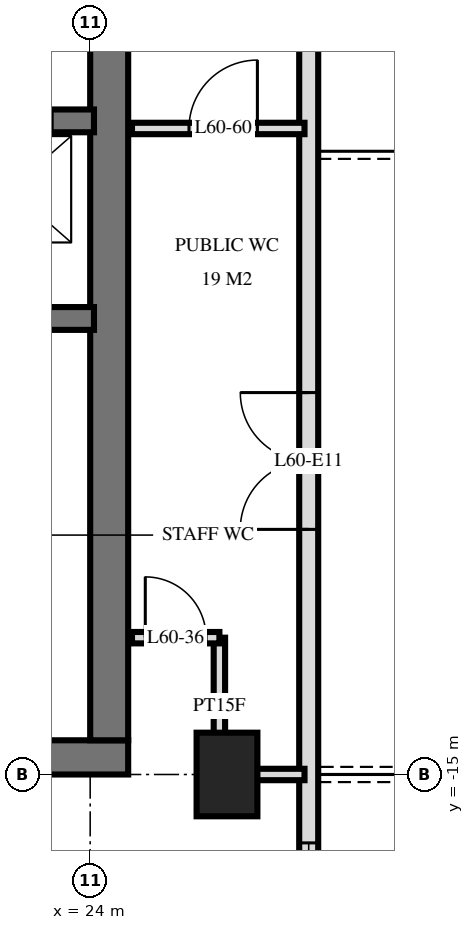
"""IFC4 building model, lengths in metres.
Left out: names, types, materials, properties, quantities, classifications, styles, units other than length and angle.
Written with IfcOpenShell. Run it as: python <this file> out.ifc"""

import sys

from ifc_helpers import new_model, si_unit, direction, frame, frame_2d, origin, origin_2d, place, context, subcontext, project, spatial, rectangle, extrude, element, fill, save


model = new_model("IFC4")
c1 = context("Model", 3, precision=1e-05, world=origin(), true_north=direction((0.0, 1.0)))
c2 = subcontext(c1, "Body", "Model", "MODEL_VIEW")
j1 = project(units=[si_unit("LENGTHUNIT", "METRE"), si_unit("PLANEANGLEUNIT", "RADIAN")], contexts=[c1])
p1 = place(None, origin())
s1 = spatial("IfcSite", under=j1, at=p1, CompositionType="ELEMENT")
p2 = place(p1, origin())
s2 = spatial("IfcBuilding", under=s1, at=p2, CompositionType="ELEMENT")
p3 = place(p2, frame((0.0, 0.0, 229.1)))
s3 = spatial("IfcBuildingStorey", under=s2, at=p3, CompositionType="ELEMENT", Elevation=229.1)
p4 = place(p3, frame((25.8, -15.0, 0.0), z_axis=(0.0, 0.0, 1.0), x_axis=(0.0, 1.0, 0.0)))
e1 = element("IfcColumn", 1, at=p4, inside=s3, PredefinedType="COLUMN", context=c2, shape_type="SweptSolid", body=[
    extrude(rectangle(XDim=1.1, YDim=0.8, at=origin_2d()), origin(), (0.0, 0.0, 1.0), 3.5),
])
p5 = place(p3, frame((10.0, -14.775, 0.0), z_axis=(0.0, 0.0, 1.0), x_axis=(1.0, 0.0, 0.0)))
e2 = element("IfcWall", 2, at=p5, inside=s3, PredefinedType="SHEAR", context=c2, shape_type="SweptSolid", body=[
    extrude(rectangle(XDim=14.5, YDim=0.45, at=frame_2d((7.25, 0.0))), origin(), (0.0, 0.0, 1.0), 3.5),
])
p6 = place(p5, frame((7.1, 0.0, 0.0)))
e3 = element("IfcOpeningElement", 3, at=p6, cuts=e2, PredefinedType="OPENING", context=c2, shape_type="SweptSolid", body=[
    extrude(rectangle(XDim=1.2, YDim=2.1, at=frame_2d((0.6, 1.05))), frame((0.0, 0.235, 0.0), z_axis=(0.0, -1.0, 0.0), x_axis=(1.0, 0.0, 0.0)), (0.0, 0.0, 1.0), 0.47),
])
p7 = place(p5, frame((4.15, 0.0, 0.0)))
e4 = element("IfcOpeningElement", 4, at=p7, cuts=e2, PredefinedType="OPENING", context=c2, shape_type="SweptSolid", body=[
    extrude(rectangle(XDim=1.1, YDim=2.1, at=frame_2d((0.55, 1.05))), frame((0.0, 0.235, 0.0), z_axis=(0.0, -1.0, 0.0), x_axis=(1.0, 0.0, 0.0)), (0.0, 0.0, 1.0), 0.47),
])
p8 = place(p5, frame((10.1, 0.0, 0.0)))
e5 = element("IfcOpeningElement", 5, at=p8, cuts=e2, PredefinedType="OPENING", context=c2, shape_type="SweptSolid", body=[
    extrude(rectangle(XDim=0.9, YDim=2.1, at=frame_2d((0.45, 1.05))), frame((0.0, 0.235, 0.0), z_axis=(0.0, -1.0, 0.0), x_axis=(1.0, 0.0, 0.0)), (0.0, 0.0, 1.0), 0.47),
])
p9 = place(p5, frame((12.45, 0.0, 0.0)))
e6 = element("IfcOpeningElement", 6, at=p9, cuts=e2, PredefinedType="OPENING", context=c2, shape_type="SweptSolid", body=[
    extrude(rectangle(XDim=1.0, YDim=2.1, at=frame_2d((0.5, 1.05))), frame((0.0, 0.235, 0.0), z_axis=(0.0, -1.0, 0.0), x_axis=(1.0, 0.0, 0.0)), (0.0, 0.0, 1.0), 0.47),
])
p10 = place(p3, frame((24.25, -14.55, 0.0), z_axis=(0.0, 0.0, 1.0), x_axis=(0.0, 1.0, 0.0)))
e7 = element("IfcWall", 7, at=p10, inside=s3, PredefinedType="SHEAR", context=c2, shape_type="SweptSolid", body=[
    extrude(rectangle(XDim=14.1, YDim=0.5, at=frame_2d((7.05, 0.0))), origin(), (0.0, 0.0, 1.0), 3.5),
])
p11 = place(p3, frame((10.35, -6.4, 0.0), z_axis=(0.0, 0.0, 1.0), x_axis=(1.0, 0.0, 0.0)))
e8 = element("IfcWall", 8, at=p11, inside=s3, PredefinedType="SHEAR", context=c2, shape_type="SweptSolid", body=[
    extrude(rectangle(XDim=13.7, YDim=0.3, at=frame_2d((6.85, 0.0))), origin(), (0.0, 0.0, 1.0), 3.5),
])
p12 = place(p11, frame((12.05, 0.0, 0.0)))
e9 = element("IfcOpeningElement", 9, at=p12, cuts=e8, PredefinedType="OPENING", context=c2, shape_type="SweptSolid", body=[
    extrude(rectangle(XDim=1.1, YDim=2.1, at=frame_2d((0.55, 1.05))), frame((0.0, 0.16, 0.0), z_axis=(0.0, -1.0, 0.0), x_axis=(1.0, 0.0, 0.0)), (0.0, 0.0, 1.0), 0.32),
])
p13 = place(p11, frame((6.8, 0.0, 0.0)))
e10 = element("IfcOpeningElement", 10, at=p13, cuts=e8, PredefinedType="OPENING", context=c2, shape_type="SweptSolid", body=[
    extrude(rectangle(XDim=1.1, YDim=2.1, at=frame_2d((0.55, 1.05))), frame((0.0, 0.16, 0.0), z_axis=(0.0, -1.0, 0.0), x_axis=(1.0, 0.0, 0.0)), (0.0, 0.0, 1.0), 0.32),
])
p14 = place(p3, frame((10.35, -9.0, 0.0), z_axis=(0.0, 0.0, 1.0), x_axis=(1.0, 0.0, 0.0)))
e11 = element("IfcWall", 11, at=p14, inside=s3, PredefinedType="SHEAR", context=c2, shape_type="SweptSolid", body=[
    extrude(rectangle(XDim=13.7, YDim=0.3, at=frame_2d((6.85, 0.0))), origin(), (0.0, 0.0, 1.0), 3.5),
])
p15 = place(p14, frame((3.8, 0.0, 0.0)))
e12 = element("IfcOpeningElement", 12, at=p15, cuts=e11, PredefinedType="OPENING", context=c2, shape_type="SweptSolid", body=[
    extrude(rectangle(XDim=1.1, YDim=2.1, at=frame_2d((0.55, 1.05))), frame((0.0, 0.16, 0.0), z_axis=(0.0, -1.0, 0.0), x_axis=(1.0, 0.0, 0.0)), (0.0, 0.0, 1.0), 0.32),
])
p16 = place(p3, frame((26.875, -24.875, 0.0), z_axis=(0.0, 0.0, 1.0), x_axis=(0.0, 1.0, 0.0)))
e13 = element("IfcWall", 13, at=p16, inside=s3, PredefinedType="SOLIDWALL", context=c2, shape_type="SweptSolid", body=[
    extrude(rectangle(XDim=21.551, YDim=0.25, at=frame_2d((10.775, 0.0))), origin(), (0.0, 0.0, 1.0), 3.22),
])
p17 = place(p16, frame((0.575, 0.0, 0.0)))
e14 = element("IfcOpeningElement", 14, at=p17, cuts=e13, PredefinedType="OPENING", context=c2, shape_type="SweptSolid", body=[
    extrude(rectangle(XDim=1.8, YDim=2.4, at=frame_2d((0.9, 1.2))), frame((0.0, 0.135, 0.0), z_axis=(0.0, -1.0, 0.0), x_axis=(1.0, 0.0, 0.0)), (0.0, 0.0, 1.0), 0.27),
])
p18 = place(p16, frame((4.475, 0.0, 0.0)))
e15 = element("IfcOpeningElement", 15, at=p18, cuts=e13, PredefinedType="OPENING", context=c2, shape_type="SweptSolid", body=[
    extrude(rectangle(XDim=1.8, YDim=2.4, at=frame_2d((0.9, 1.2))), frame((0.0, 0.135, 0.0), z_axis=(0.0, -1.0, 0.0), x_axis=(1.0, 0.0, 0.0)), (0.0, 0.0, 1.0), 0.27),
])
p19 = place(p16, frame((7.775, 0.0, 0.9)))
e16 = element("IfcOpeningElement", 16, at=p19, cuts=e13, PredefinedType="OPENING", context=c2, shape_type="SweptSolid", body=[
    extrude(rectangle(XDim=1.2, YDim=1.5, at=frame_2d((0.6, 0.75))), frame((0.0, 0.135, 0.0), z_axis=(0.0, -1.0, 0.0), x_axis=(1.0, 0.0, 0.0)), (0.0, 0.0, 1.0), 0.27),
])
p20 = place(p16, frame((13.1, 0.0, 0.0)))
e17 = element("IfcOpeningElement", 17, at=p20, cuts=e13, PredefinedType="OPENING", context=c2, shape_type="SweptSolid", body=[
    extrude(rectangle(XDim=1.8, YDim=2.4, at=frame_2d((0.9, 1.2))), frame((0.0, 0.135, 0.0), z_axis=(0.0, -1.0, 0.0), x_axis=(1.0, 0.0, 0.0)), (0.0, 0.0, 1.0), 0.27),
])
p21 = place(p3, frame((25.7, -15.0, 0.0), z_axis=(0.0, 0.0, 1.0), x_axis=(0.0, 1.0, 0.0)))
e18 = element("IfcWall", 18, at=p21, inside=s3, PredefinedType="PARTITIONING", context=c2, shape_type="SweptSolid", body=[
    extrude(rectangle(XDim=1.8, YDim=0.15, at=frame_2d((0.9, 0.0))), origin(), (0.0, 0.0, 1.0), 3.22),
])
p22 = place(p3, frame((25.7, -15.0, 0.0), z_axis=(0.0, 0.0, 1.0), x_axis=(1.0, 0.0, 0.0)))
e19 = element("IfcWall", 19, at=p22, inside=s3, PredefinedType="PARTITIONING", context=c2, shape_type="SweptSolid", body=[
    extrude(rectangle(XDim=1.12, YDim=0.15, at=frame_2d((0.56, 0.0))), origin(), (0.0, 0.0, 1.0), 3.22),
])
p23 = place(p3, frame((24.55, -13.2, 0.0), z_axis=(0.0, 0.0, 1.0), x_axis=(1.0, 0.0, 0.0)))
e20 = element("IfcWall", 20, at=p23, inside=s3, PredefinedType="PARTITIONING", context=c2, shape_type="SweptSolid", body=[
    extrude(rectangle(XDim=1.15, YDim=0.15, at=frame_2d((0.575, 0.0))), origin(), (0.0, 0.0, 1.0), 3.22),
])
p24 = place(p23, frame((0.175, 0.0, 0.0)))
e21 = element("IfcOpeningElement", 21, at=p24, cuts=e20, PredefinedType="OPENING", context=c2, shape_type="SweptSolid", body=[
    extrude(rectangle(XDim=0.8, YDim=2.1, at=frame_2d((0.4, 1.05))), frame((0.0, 0.085, 0.0), z_axis=(0.0, -1.0, 0.0), x_axis=(1.0, 0.0, 0.0)), (0.0, 0.0, 1.0), 0.17),
])
p25 = place(p3, frame((24.55, -6.5, 0.0), z_axis=(0.0, 0.0, 1.0), x_axis=(1.0, 0.0, 0.0)))
e22 = element("IfcWall", 22, at=p25, inside=s3, PredefinedType="PLUMBINGWALL", context=c2, shape_type="SweptSolid", body=[
    extrude(rectangle(XDim=2.27, YDim=0.15, at=frame_2d((1.135, 0.0))), origin(), (0.0, 0.0, 1.0), 3.22),
])
p26 = place(p25, frame((0.75, 0.0, 0.0)))
e23 = element("IfcOpeningElement", 23, at=p26, cuts=e22, PredefinedType="OPENING", context=c2, shape_type="SweptSolid", body=[
    extrude(rectangle(XDim=0.9, YDim=2.1, at=frame_2d((0.45, 1.05))), frame((0.0, 0.085, 0.0), z_axis=(0.0, -1.0, 0.0), x_axis=(1.0, 0.0, 0.0)), (0.0, 0.0, 1.0), 0.17),
])
p27 = place(p19, origin())
e24 = element("IfcWindow", 24, at=p27, inside=s3, PartitioningType="SINGLE_PANEL", PredefinedType="WINDOW", context=c2, shape_type="SweptSolid", body=[
    extrude(rectangle(XDim=1.2, YDim=1.5, at=frame_2d((0.6, 0.75))), frame((0.0, 0.03, 0.0), z_axis=(0.0, -1.0, 0.0), x_axis=(1.0, 0.0, 0.0)), (0.0, 0.0, 1.0), 0.06),
])
fill(e16, e24)
p28 = place(p20, origin())
e25 = element("IfcDoor", 25, at=p28, inside=s3, OperationType="DOUBLE_DOOR_SINGLE_SWING", PredefinedType="DOOR", context=c2, shape_type="SweptSolid", body=[
    extrude(rectangle(XDim=1.8, YDim=2.4, at=frame_2d((0.9, 1.2))), frame((0.0, 0.025, 0.0), z_axis=(0.0, -1.0, 0.0), x_axis=(1.0, 0.0, 0.0)), (0.0, 0.0, 1.0), 0.05),
])
fill(e17, e25)
p29 = place(p12, origin())
e26 = element("IfcDoor", 26, at=p29, inside=s3, OperationType="DOUBLE_DOOR_SLIDING", PredefinedType="USERDEFINED", context=c2, shape_type="SweptSolid", body=[
    extrude(rectangle(XDim=1.1, YDim=2.1, at=frame_2d((0.55, 1.05))), frame((0.0, 0.025, 0.0), z_axis=(0.0, -1.0, 0.0), x_axis=(1.0, 0.0, 0.0)), (0.0, 0.0, 1.0), 0.05),
])
fill(e9, e26)
p30 = place(p24, origin())
e27 = element("IfcDoor", 27, at=p30, inside=s3, OperationType="SINGLE_SWING_RIGHT", PredefinedType="DOOR", context=c2, shape_type="SweptSolid", body=[
    extrude(rectangle(XDim=0.8, YDim=2.1, at=frame_2d((0.4, 1.05))), frame((0.0, 0.025, 0.0), z_axis=(0.0, -1.0, 0.0), x_axis=(1.0, 0.0, 0.0)), (0.0, 0.0, 1.0), 0.05),
])
fill(e21, e27)
p31 = place(p26, origin())
e28 = element("IfcDoor", 28, at=p31, inside=s3, OperationType="SINGLE_SWING_LEFT", PredefinedType="DOOR", context=c2, shape_type="SweptSolid", body=[
    extrude(rectangle(XDim=0.9, YDim=2.1, at=frame_2d((0.45, 1.05))), frame((0.0, 0.025, 0.0), z_axis=(0.0, -1.0, 0.0), x_axis=(1.0, 0.0, 0.0)), (0.0, 0.0, 1.0), 0.05),
])
fill(e23, e28)
save(model, sys.argv[1])
